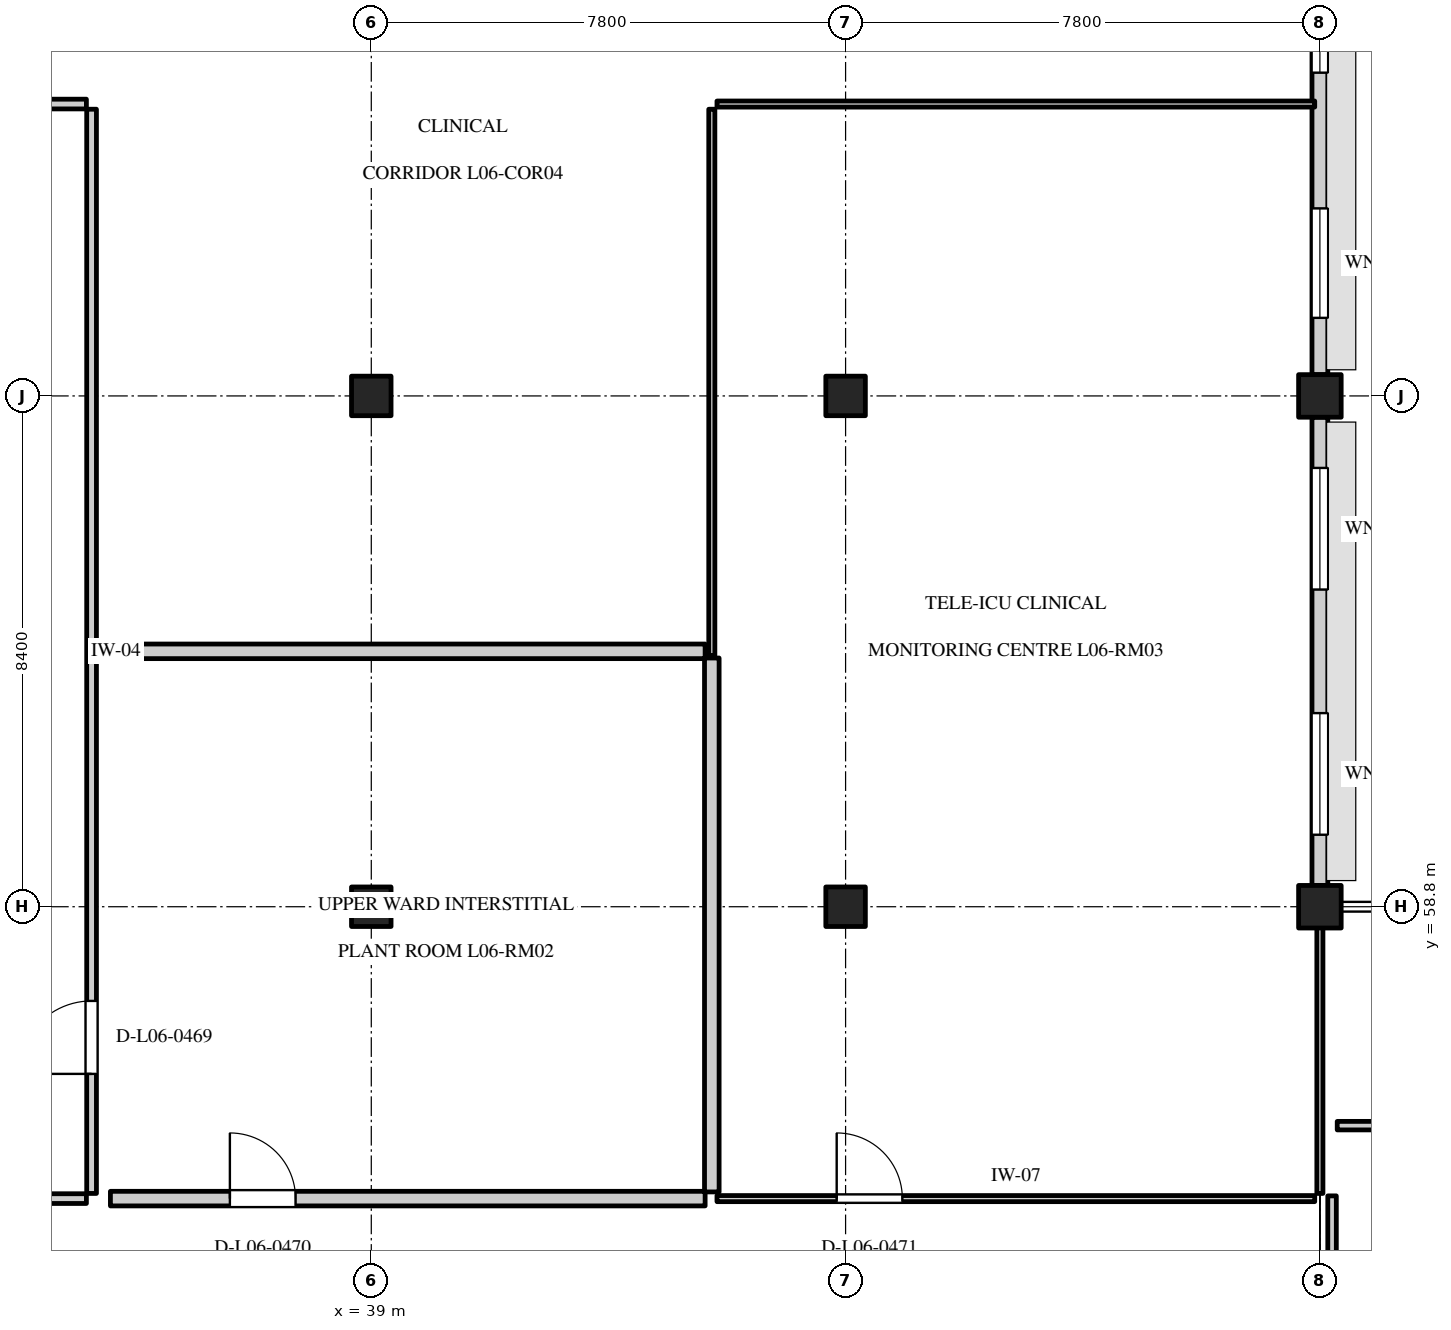
"""IFC4 building model, lengths in metres.
Left out: names, types, materials, properties, quantities, classifications, styles, units other than length and angle.
Written with IfcOpenShell. Run it as: python <this file> out.ifc"""

import sys

from ifc_helpers import new_model, si_unit, direction, frame, frame_2d, origin, origin_2d, place, context, subcontext, project, spatial, rectangle, extrude, element, fill, save


model = new_model("IFC4")
c1 = context("Model", 3, precision=1e-05, world=origin(), true_north=direction((0.0, 1.0)))
c2 = subcontext(c1, "Body", "Model", "MODEL_VIEW")
j1 = project(units=[si_unit("LENGTHUNIT", "METRE"), si_unit("PLANEANGLEUNIT", "RADIAN")], contexts=[c1])
p1 = place(None, origin())
s1 = spatial("IfcSite", under=j1, at=p1, CompositionType="ELEMENT")
p2 = place(p1, origin())
s2 = spatial("IfcBuilding", under=s1, at=p2, CompositionType="ELEMENT")
p3 = place(p2, frame((0.0, 0.0, 26.1)))
s3 = spatial("IfcBuildingStorey", under=s2, at=p3, CompositionType="ELEMENT", Elevation=26.1)
for number, where, z_axis, x_axis in (
    (1, (39.0, 58.8, 0.0), (0.0, 0.0, 1.0), (1.0, 0.0, 0.0)),
    (2, (39.0, 67.2, 0.0), (0.0, 0.0, 1.0), (1.0, 0.0, 0.0)),
    (3, (46.8, 58.8, 0.0), (0.0, 0.0, 1.0), (1.0, 0.0, 0.0)),
    (4, (46.8, 67.2, 0.0), (0.0, 0.0, 1.0), (1.0, 0.0, 0.0)),
):
    element("IfcColumn", number, at=place(p3, frame(where, z_axis=z_axis, x_axis=x_axis)), inside=s3, PredefinedType="COLUMN", context=c2, shape_type="SweptSolid", body=[
        extrude(rectangle(XDim=0.65, YDim=0.65, at=origin_2d()), origin(), (0.0, 0.0, 1.0), 3.6),
    ])
for number, where, z_axis, x_axis in (
    (5, (54.6, 58.8, 0.0), (0.0, 0.0, 1.0), (1.0, 0.0, 0.0)),
    (6, (54.6, 67.2, 0.0), (0.0, 0.0, 1.0), (1.0, 0.0, 0.0)),
):
    element("IfcColumn", number, at=place(p3, frame(where, z_axis=z_axis, x_axis=x_axis)), inside=s3, PredefinedType="COLUMN", context=c2, shape_type="SweptSolid", body=[
        extrude(rectangle(XDim=0.7, YDim=0.7, at=origin_2d()), origin(), (0.0, 0.0, 1.0), 3.6),
    ])
p4 = place(p3, frame((54.6, 59.15, 0.0), z_axis=(0.0, 0.0, 1.0), x_axis=(0.0, 1.0, 0.0)))
e7 = element("IfcWall", 7, at=p4, inside=s3, PredefinedType="STANDARD", context=c2, shape_type="SweptSolid", body=[
    extrude(rectangle(XDim=7.7, YDim=0.26, at=frame_2d((3.85, 0.0))), origin(), (0.0, 0.0, 1.0), 2.65),
])
p5 = place(p4, frame((0.834, 0.0, 0.8)))
e8 = element("IfcOpeningElement", 8, at=p5, cuts=e7, PredefinedType="OPENING", context=c2, shape_type="SweptSolid", body=[
    extrude(rectangle(XDim=2.0, YDim=1.45, at=frame_2d((1.0, 0.725))), frame((0.0, 0.142, 0.0), z_axis=(0.0, -1.0, 0.0), x_axis=(1.0, 0.0, 0.0)), (0.0, 0.0, 1.0), 0.284),
])
p6 = place(p4, frame((4.866, 0.0, 0.8)))
e9 = element("IfcOpeningElement", 9, at=p6, cuts=e7, PredefinedType="OPENING", context=c2, shape_type="SweptSolid", body=[
    extrude(rectangle(XDim=2.0, YDim=1.45, at=frame_2d((1.0, 0.725))), frame((0.0, 0.142, 0.0), z_axis=(0.0, -1.0, 0.0), x_axis=(1.0, 0.0, 0.0)), (0.0, 0.0, 1.0), 0.284),
])
p7 = place(p3, frame((54.6, 67.55, 0.0), z_axis=(0.0, 0.0, 1.0), x_axis=(0.0, 1.0, 0.0)))
e10 = element("IfcWall", 10, at=p7, inside=s3, PredefinedType="STANDARD", context=c2, shape_type="SweptSolid", body=[
    extrude(rectangle(XDim=7.7, YDim=0.26, at=frame_2d((3.85, 0.0))), origin(), (0.0, 0.0, 1.0), 2.65),
])
p8 = place(p7, frame((0.934, 0.0, 0.8)))
e11 = element("IfcOpeningElement", 11, at=p8, cuts=e10, PredefinedType="OPENING", context=c2, shape_type="SweptSolid", body=[
    extrude(rectangle(XDim=1.8, YDim=1.55, at=frame_2d((0.9, 0.775))), frame((0.0, 0.142, 0.0), z_axis=(0.0, -1.0, 0.0), x_axis=(1.0, 0.0, 0.0)), (0.0, 0.0, 1.0), 0.284),
])
p9 = place(p7, frame((4.966, 0.0, 0.8)))
e12 = element("IfcOpeningElement", 12, at=p9, cuts=e10, PredefinedType="OPENING", context=c2, shape_type="SweptSolid", body=[
    extrude(rectangle(XDim=1.8, YDim=1.55, at=frame_2d((0.9, 0.775))), frame((0.0, 0.142, 0.0), z_axis=(0.0, -1.0, 0.0), x_axis=(1.0, 0.0, 0.0)), (0.0, 0.0, 1.0), 0.284),
])
p10 = place(p3, frame((34.4, 54.085, 0.0), z_axis=(0.0, 0.0, 1.0), x_axis=(0.0, 1.0, 0.0)))
e13 = element("IfcWall", 13, at=p10, inside=s3, PredefinedType="PARTITIONING", context=c2, shape_type="SweptSolid", body=[
    extrude(rectangle(XDim=17.83, YDim=0.16, at=frame_2d((8.915, 0.0))), origin(), (0.0, 0.0, 1.0), 3.28),
])
p11 = place(p10, frame((1.966, 0.0, 0.0)))
e14 = element("IfcOpeningElement", 14, at=p11, cuts=e13, PredefinedType="OPENING", context=c2, shape_type="SweptSolid", body=[
    extrude(rectangle(XDim=1.2, YDim=2.15, at=frame_2d((0.6, 1.075))), frame((0.0, 0.092, 0.0), z_axis=(0.0, -1.0, 0.0), x_axis=(1.0, 0.0, 0.0)), (0.0, 0.0, 1.0), 0.184),
])
for number, where, z_axis, x_axis in (
    (15, (23.485, 54.0, 0.0), (0.0, 0.0, 1.0), (1.0, 0.0, 0.0)),
    (16, (23.485, 72.0, 0.0), (0.0, 0.0, 1.0), (1.0, 0.0, 0.0)),
):
    element("IfcWall", number, at=place(p3, frame(where, z_axis=z_axis, x_axis=x_axis)), inside=s3, PredefinedType="PARTITIONING", context=c2, shape_type="SweptSolid", body=[
        extrude(rectangle(XDim=10.83, YDim=0.16, at=frame_2d((5.415, 0.0))), origin(), (0.0, 0.0, 1.0), 3.28),
    ])
p12 = place(p3, frame((34.71, 54.0, 0.0), z_axis=(0.0, 0.0, 1.0), x_axis=(1.0, 0.0, 0.0)))
e17 = element("IfcWall", 17, at=p12, inside=s3, PredefinedType="STANDARD", context=c2, shape_type="SweptSolid", body=[
    extrude(rectangle(XDim=9.78, YDim=0.24, at=frame_2d((4.89, 0.0))), origin(), (0.0, 0.0, 1.0), 3.28),
])
p13 = place(p12, frame((1.965, 0.0, 0.0)))
e18 = element("IfcOpeningElement", 18, at=p13, cuts=e17, PredefinedType="OPENING", context=c2, shape_type="SweptSolid", body=[
    extrude(rectangle(XDim=1.08, YDim=2.15, at=frame_2d((0.54, 1.075))), frame((0.0, 0.132, 0.0), z_axis=(0.0, -1.0, 0.0), x_axis=(1.0, 0.0, 0.0)), (0.0, 0.0, 1.0), 0.264),
])
p14 = place(p3, frame((34.71, 63.0, 0.0), z_axis=(0.0, 0.0, 1.0), x_axis=(1.0, 0.0, 0.0)))
e19 = element("IfcWall", 19, at=p14, inside=s3, PredefinedType="STANDARD", context=c2, shape_type="SweptSolid", body=[
    extrude(rectangle(XDim=9.78, YDim=0.24, at=frame_2d((4.89, 0.0))), origin(), (0.0, 0.0, 1.0), 3.28),
])
p15 = place(p3, frame((44.6, 54.11, 0.0), z_axis=(0.0, 0.0, 1.0), x_axis=(0.0, 1.0, 0.0)))
e20 = element("IfcWall", 20, at=p15, inside=s3, PredefinedType="STANDARD", context=c2, shape_type="SweptSolid", body=[
    extrude(rectangle(XDim=8.78, YDim=0.24, at=frame_2d((4.39, 0.0))), origin(), (0.0, 0.0, 1.0), 3.28),
])
p16 = place(p3, frame((44.685, 54.0, 0.0), z_axis=(0.0, 0.0, 1.0), x_axis=(1.0, 0.0, 0.0)))
e21 = element("IfcWall", 21, at=p16, inside=s3, PredefinedType="PARTITIONING", context=c2, shape_type="SweptSolid", body=[
    extrude(rectangle(XDim=9.83, YDim=0.1, at=frame_2d((4.915, 0.0))), origin(), (0.0, 0.0, 1.0), 3.28),
])
p17 = place(p16, frame((1.969, 0.0, 0.0)))
e22 = element("IfcOpeningElement", 22, at=p17, cuts=e21, PredefinedType="OPENING", context=c2, shape_type="SweptSolid", body=[
    extrude(rectangle(XDim=1.08, YDim=2.15, at=frame_2d((0.54, 1.075))), frame((0.0, 0.062, 0.0), z_axis=(0.0, -1.0, 0.0), x_axis=(1.0, 0.0, 0.0)), (0.0, 0.0, 1.0), 0.124),
])
p18 = place(p3, frame((44.685, 72.0, 0.0), z_axis=(0.0, 0.0, 1.0), x_axis=(1.0, 0.0, 0.0)))
e23 = element("IfcWall", 23, at=p18, inside=s3, PredefinedType="PARTITIONING", context=c2, shape_type="SweptSolid", body=[
    extrude(rectangle(XDim=9.83, YDim=0.1, at=frame_2d((4.915, 0.0))), origin(), (0.0, 0.0, 1.0), 3.28),
])
p19 = place(p3, frame((44.6, 62.93, 0.0), z_axis=(0.0, 0.0, 1.0), x_axis=(0.0, 1.0, 0.0)))
e24 = element("IfcWall", 24, at=p19, inside=s3, PredefinedType="PARTITIONING", context=c2, shape_type="SweptSolid", body=[
    extrude(rectangle(XDim=8.985, YDim=0.1, at=frame_2d((4.493, 0.0))), origin(), (0.0, 0.0, 1.0), 3.28),
])
p20 = place(p3, frame((54.6, 54.085, 0.0), z_axis=(0.0, 0.0, 1.0), x_axis=(0.0, 1.0, 0.0)))
e25 = element("IfcWall", 25, at=p20, inside=s3, PredefinedType="PARTITIONING", context=c2, shape_type="SweptSolid", body=[
    extrude(rectangle(XDim=5.025, YDim=0.1, at=frame_2d((2.513, 0.0))), origin(), (0.0, 0.0, 1.0), 2.65),
])
p21 = place(p3, frame((54.6, 66.89, 0.0), z_axis=(0.0, 0.0, 1.0), x_axis=(0.0, 1.0, 0.0)))
e26 = element("IfcWall", 26, at=p21, inside=s3, PredefinedType="PARTITIONING", context=c2, shape_type="SweptSolid", body=[
    extrude(rectangle(XDim=0.62, YDim=0.1, at=frame_2d((0.31, 0.0))), origin(), (0.0, 0.0, 1.0), 2.65),
])
p22 = place(p3, frame((54.885, 55.2, 0.0), z_axis=(0.0, 0.0, 1.0), x_axis=(1.0, 0.0, 0.0)))
e27 = element("IfcWall", 27, at=p22, inside=s3, PredefinedType="PARTITIONING", context=c2, shape_type="SweptSolid", body=[
    extrude(rectangle(XDim=15.03, YDim=0.14, at=frame_2d((7.515, 0.0))), origin(), (0.0, 0.0, 1.0), 3.28),
])
p23 = place(p22, frame((1.963, 0.0, 0.0)))
e28 = element("IfcOpeningElement", 28, at=p23, cuts=e27, PredefinedType="OPENING", context=c2, shape_type="SweptSolid", body=[
    extrude(rectangle(XDim=1.85, YDim=2.3, at=frame_2d((0.925, 1.15))), frame((0.0, 0.082, 0.0), z_axis=(0.0, -1.0, 0.0), x_axis=(1.0, 0.0, 0.0)), (0.0, 0.0, 1.0), 0.164),
])
p24 = place(p3, frame((54.8, 50.485, 0.0), z_axis=(0.0, 0.0, 1.0), x_axis=(0.0, 1.0, 0.0)))
e29 = element("IfcWall", 29, at=p24, inside=s3, PredefinedType="PARTITIONING", context=c2, shape_type="SweptSolid", body=[
    extrude(rectangle(XDim=3.56, YDim=0.14, at=frame_2d((1.78, 0.0))), origin(), (0.0, 0.0, 1.0), 2.65),
])
p25 = place(p5, origin())
e30 = element("IfcWindow", 30, at=p25, inside=s3, PartitioningType="DOUBLE_PANEL_VERTICAL", PredefinedType="WINDOW", context=c2, shape_type="SweptSolid", body=[
    extrude(rectangle(XDim=2.0, YDim=1.45, at=frame_2d((1.0, 0.725))), frame((0.0, 0.03, 0.0), z_axis=(0.0, -1.0, 0.0), x_axis=(1.0, 0.0, 0.0)), (0.0, 0.0, 1.0), 0.06),
])
fill(e8, e30)
p26 = place(p6, origin())
e31 = element("IfcWindow", 31, at=p26, inside=s3, PartitioningType="DOUBLE_PANEL_VERTICAL", PredefinedType="WINDOW", context=c2, shape_type="SweptSolid", body=[
    extrude(rectangle(XDim=2.0, YDim=1.45, at=frame_2d((1.0, 0.725))), frame((0.0, 0.03, 0.0), z_axis=(0.0, -1.0, 0.0), x_axis=(1.0, 0.0, 0.0)), (0.0, 0.0, 1.0), 0.06),
])
fill(e9, e31)
p27 = place(p8, origin())
e32 = element("IfcWindow", 32, at=p27, inside=s3, PartitioningType="DOUBLE_PANEL_VERTICAL", PredefinedType="WINDOW", context=c2, shape_type="SweptSolid", body=[
    extrude(rectangle(XDim=1.8, YDim=1.55, at=frame_2d((0.9, 0.775))), frame((0.0, 0.03, 0.0), z_axis=(0.0, -1.0, 0.0), x_axis=(1.0, 0.0, 0.0)), (0.0, 0.0, 1.0), 0.06),
])
fill(e11, e32)
p28 = place(p9, origin())
e33 = element("IfcWindow", 33, at=p28, inside=s3, PartitioningType="DOUBLE_PANEL_VERTICAL", PredefinedType="WINDOW", context=c2, shape_type="SweptSolid", body=[
    extrude(rectangle(XDim=1.8, YDim=1.55, at=frame_2d((0.9, 0.775))), frame((0.0, 0.03, 0.0), z_axis=(0.0, -1.0, 0.0), x_axis=(1.0, 0.0, 0.0)), (0.0, 0.0, 1.0), 0.06),
])
fill(e12, e33)
p29 = place(p11, origin())
e34 = element("IfcDoor", 34, at=p29, inside=s3, OperationType="SINGLE_SWING_LEFT", PredefinedType="DOOR", context=c2, shape_type="SweptSolid", body=[
    extrude(rectangle(XDim=1.2, YDim=2.15, at=frame_2d((0.6, 1.075))), frame((0.0, 0.025, 0.0), z_axis=(0.0, -1.0, 0.0), x_axis=(1.0, 0.0, 0.0)), (0.0, 0.0, 1.0), 0.05),
])
fill(e14, e34)
p30 = place(p13, origin())
e35 = element("IfcDoor", 35, at=p30, inside=s3, OperationType="SINGLE_SWING_LEFT", PredefinedType="DOOR", context=c2, shape_type="SweptSolid", body=[
    extrude(rectangle(XDim=1.08, YDim=2.15, at=frame_2d((0.54, 1.075))), frame((0.0, 0.025, 0.0), z_axis=(0.0, -1.0, 0.0), x_axis=(1.0, 0.0, 0.0)), (0.0, 0.0, 1.0), 0.05),
])
fill(e18, e35)
p31 = place(p17, origin())
e36 = element("IfcDoor", 36, at=p31, inside=s3, OperationType="SINGLE_SWING_LEFT", PredefinedType="DOOR", context=c2, shape_type="SweptSolid", body=[
    extrude(rectangle(XDim=1.08, YDim=2.15, at=frame_2d((0.54, 1.075))), frame((0.0, 0.025, 0.0), z_axis=(0.0, -1.0, 0.0), x_axis=(1.0, 0.0, 0.0)), (0.0, 0.0, 1.0), 0.05),
])
fill(e22, e36)
save(model, sys.argv[1])
